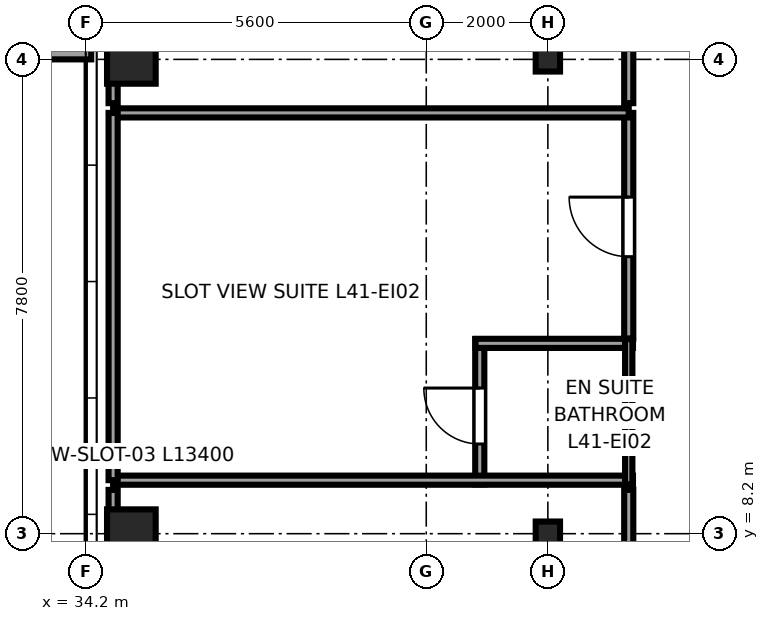
"""IFC4 building model, lengths in metres.
Left out: names, types, materials, properties, quantities, classifications, styles, units other than length and angle.
Written with IfcOpenShell. Run it as: python <this file> out.ifc"""

import sys

from ifc_helpers import new_model, si_unit, direction, frame, frame_2d, origin, origin_2d, place, context, subcontext, project, spatial, rectangle, i_section, extrude, source, transform, mapped, element, fill, save


model = new_model("IFC4")
c1 = context("Model", 3, precision=1e-05, world=origin(), true_north=direction((0.0, 1.0)))
c2 = subcontext(c1, "Body", "Model", "MODEL_VIEW")
j1 = project(units=[si_unit("LENGTHUNIT", "METRE"), si_unit("PLANEANGLEUNIT", "RADIAN")], contexts=[c1])
p1 = place(None, origin())
s1 = spatial("IfcSite", under=j1, at=p1, CompositionType="ELEMENT")
p2 = place(p1, origin())
s2 = spatial("IfcBuilding", under=s1, at=p2, CompositionType="ELEMENT")
p3 = place(p2, frame((0.0, 0.0, 157.7)))
s3 = spatial("IfcBuildingStorey", under=s2, at=p3, CompositionType="ELEMENT", Elevation=157.7)
m1 = source(origin(), c2, "Body", "SweptSolid", [
    extrude(rectangle(XDim=0.8, YDim=0.8, at=origin_2d()), origin(), (0.0, 0.0, 1.0), 3.55),
])
for number, where, z_axis, x_axis in (
    (1, (34.95, 8.2, 0.0), (0.0, 0.0, 1.0), (1.0, 0.0, 0.0)),
    (2, (34.95, 16.0, 0.0), (0.0, 0.0, 1.0), (1.0, 0.0, 0.0)),
):
    element("IfcColumn", number, at=place(p3, frame(where, z_axis=z_axis, x_axis=x_axis)), inside=s3, PredefinedType="COLUMN", context=c2, shape_type="MappedRepresentation", body=[
        mapped(m1, transform((0.0, 0.0, 0.0), x_axis=(1.0, 0.0, 0.0), y_axis=(0.0, 1.0, 0.0), z_axis=(0.0, 0.0, 1.0), scale=1.0)),
    ])
m2 = source(origin(), c2, "Body", "SweptSolid", [
    extrude(i_section(OverallWidth=0.4, OverallDepth=0.4, WebThickness=0.02, FlangeThickness=0.035, at=origin_2d()), origin(), (0.0, 0.0, 1.0), 3.55),
])
for number, where, z_axis, x_axis in (
    (3, (41.8, 8.2, 0.0), (0.0, 0.0, 1.0), (1.0, 0.0, 0.0)),
    (4, (41.8, 16.0, 0.0), (0.0, 0.0, 1.0), (1.0, 0.0, 0.0)),
):
    element("IfcColumn", number, at=place(p3, frame(where, z_axis=z_axis, x_axis=x_axis)), inside=s3, PredefinedType="COLUMN", context=c2, shape_type="MappedRepresentation", body=[
        mapped(m2, transform((0.0, 0.0, 0.0), x_axis=(1.0, 0.0, 0.0), y_axis=(0.0, 1.0, 0.0), z_axis=(0.0, 0.0, 1.0), scale=1.0)),
    ])
p4 = place(p3, frame((22.71, 16.175, 0.0), z_axis=(0.0, 0.0, 1.0), x_axis=(1.0, 0.0, 0.0)))
e5 = element("IfcWall", 5, at=p4, inside=s3, PredefinedType="SOLIDWALL", context=c2, shape_type="SweptSolid", body=[
    extrude(rectangle(XDim=11.58, YDim=0.35, at=frame_2d((5.79, 0.0))), origin(), (0.0, 0.0, 1.0), 2.758),
])
p5 = place(p4, frame((1.995, 0.0, 0.68)))
e6 = element("IfcOpeningElement", 6, at=p5, cuts=e5, PredefinedType="OPENING", context=c2, shape_type="SweptSolid", body=[
    extrude(rectangle(XDim=2.4, YDim=1.9, at=frame_2d((1.2, 0.95))), frame((0.0, 0.185, 0.0), z_axis=(0.0, -1.0, 0.0), x_axis=(1.0, 0.0, 0.0)), (0.0, 0.0, 1.0), 0.37),
])
p6 = place(p4, frame((7.185, 0.0, 0.68)))
e7 = element("IfcOpeningElement", 7, at=p6, cuts=e5, PredefinedType="OPENING", context=c2, shape_type="SweptSolid", body=[
    extrude(rectangle(XDim=2.4, YDim=1.9, at=frame_2d((1.2, 0.95))), frame((0.0, 0.185, 0.0), z_axis=(0.0, -1.0, 0.0), x_axis=(1.0, 0.0, 0.0)), (0.0, 0.0, 1.0), 0.37),
])
p7 = place(p3, frame((40.68, 9.01, 0.0), z_axis=(0.0, 0.0, 1.0), x_axis=(0.0, 1.0, 0.0)))
e8 = element("IfcWall", 8, at=p7, inside=s3, PredefinedType="PARTITIONING", context=c2, shape_type="SweptSolid", body=[
    extrude(rectangle(XDim=2.39, YDim=0.15, at=frame_2d((1.195, 0.0))), origin(), (0.0, 0.0, 1.0), 3.37),
])
p8 = place(p7, frame((0.665, 0.0, 0.0)))
e9 = element("IfcOpeningElement", 9, at=p8, cuts=e8, PredefinedType="OPENING", context=c2, shape_type="SweptSolid", body=[
    extrude(rectangle(XDim=0.92, YDim=2.01, at=frame_2d((0.46, 1.005))), frame((0.0, 0.085, 0.0), z_axis=(0.0, -1.0, 0.0), x_axis=(1.0, 0.0, 0.0)), (0.0, 0.0, 1.0), 0.17),
])
p9 = place(p3, frame((34.65, 9.08, 0.0), z_axis=(0.0, 0.0, 1.0), x_axis=(1.0, 0.0, 0.0)))
e10 = element("IfcWall", 10, at=p9, inside=s3, PredefinedType="PARTITIONING", context=c2, shape_type="SweptSolid", body=[
    extrude(rectangle(XDim=8.55, YDim=0.15, at=frame_2d((4.275, 0.0))), origin(), (0.0, 0.0, 1.0), 3.37),
])
p10 = place(p3, frame((40.61, 11.33, 0.0), z_axis=(0.0, 0.0, 1.0), x_axis=(1.0, 0.0, 0.0)))
e11 = element("IfcWall", 11, at=p10, inside=s3, PredefinedType="PARTITIONING", context=c2, shape_type="SweptSolid", body=[
    extrude(rectangle(XDim=2.59, YDim=0.15, at=frame_2d((1.295, 0.0))), origin(), (0.0, 0.0, 1.0), 3.37),
])
p11 = place(p3, frame((43.13, 9.01, 0.0), z_axis=(0.0, 0.0, 1.0), x_axis=(0.0, 1.0, 0.0)))
e12 = element("IfcWall", 12, at=p11, inside=s3, PredefinedType="PLUMBINGWALL", context=c2, shape_type="SweptSolid", body=[
    extrude(rectangle(XDim=2.39, YDim=0.12, at=frame_2d((1.195, 0.0))), origin(), (0.0, 0.0, 1.0), 3.37),
])
p12 = place(p3, frame((43.13, 5.91, 0.0), z_axis=(0.0, 0.0, 1.0), x_axis=(0.0, 1.0, 0.0)))
e13 = element("IfcWall", 13, at=p12, inside=s3, PredefinedType="PARTITIONING", context=c2, shape_type="SweptSolid", body=[
    extrude(rectangle(XDim=3.01, YDim=0.15, at=frame_2d((1.505, 0.0))), origin(), (0.0, 0.0, 1.0), 3.37),
])
p13 = place(p12, frame((0.995, 0.0, 0.0)))
e14 = element("IfcOpeningElement", 14, at=p13, cuts=e13, PredefinedType="OPENING", context=c2, shape_type="SweptSolid", body=[
    extrude(rectangle(XDim=0.98, YDim=2.12, at=frame_2d((0.49, 1.06))), frame((0.0, 0.085, 0.0), z_axis=(0.0, -1.0, 0.0), x_axis=(1.0, 0.0, 0.0)), (0.0, 0.0, 1.0), 0.17),
])
p14 = place(p3, frame((34.65, 3.005, 0.0), z_axis=(0.0, 0.0, 1.0), x_axis=(0.0, 1.0, 0.0)))
e15 = element("IfcWall", 15, at=p14, inside=s3, PredefinedType="PARTITIONING", context=c2, shape_type="SweptSolid", body=[
    extrude(rectangle(XDim=5.915, YDim=0.15, at=frame_2d((2.958, 0.0))), origin(), (0.0, 0.0, 1.0), 3.37),
])
p15 = place(p3, frame((43.13, 11.41, 0.0), z_axis=(0.0, 0.0, 1.0), x_axis=(0.0, 1.0, 0.0)))
e16 = element("IfcWall", 16, at=p15, inside=s3, PredefinedType="PARTITIONING", context=c2, shape_type="SweptSolid", body=[
    extrude(rectangle(XDim=3.71, YDim=0.15, at=frame_2d((1.855, 0.0))), origin(), (0.0, 0.0, 1.0), 3.37),
])
p16 = place(p15, frame((1.345, 0.0, 0.0)))
e17 = element("IfcOpeningElement", 17, at=p16, cuts=e16, PredefinedType="OPENING", context=c2, shape_type="SweptSolid", body=[
    extrude(rectangle(XDim=0.98, YDim=2.12, at=frame_2d((0.49, 1.06))), frame((0.0, 0.085, 0.0), z_axis=(0.0, -1.0, 0.0), x_axis=(1.0, 0.0, 0.0)), (0.0, 0.0, 1.0), 0.17),
])
p17 = place(p3, frame((34.65, 15.12, 0.0), z_axis=(0.0, 0.0, 1.0), x_axis=(1.0, 0.0, 0.0)))
e18 = element("IfcWall", 18, at=p17, inside=s3, PredefinedType="PARTITIONING", context=c2, shape_type="SweptSolid", body=[
    extrude(rectangle(XDim=8.48, YDim=0.15, at=frame_2d((4.24, 0.0))), origin(), (0.0, 0.0, 1.0), 3.37),
])
p18 = place(p3, frame((34.65, 9.08, 0.0), z_axis=(0.0, 0.0, 1.0), x_axis=(0.0, 1.0, 0.0)))
e19 = element("IfcWall", 19, at=p18, inside=s3, PredefinedType="PARTITIONING", context=c2, shape_type="SweptSolid", body=[
    extrude(rectangle(XDim=6.04, YDim=0.15, at=frame_2d((3.02, 0.0))), origin(), (0.0, 0.0, 1.0), 3.37),
])
p19 = place(p3, frame((43.13, 15.28, 0.0), z_axis=(0.0, 0.0, 1.0), x_axis=(0.0, 1.0, 0.0)))
e20 = element("IfcWall", 20, at=p19, inside=s3, PredefinedType="PARTITIONING", context=c2, shape_type="SweptSolid", body=[
    extrude(rectangle(XDim=3.61, YDim=0.15, at=frame_2d((1.805, 0.0))), origin(), (0.0, 0.0, 1.0), 3.37),
])
p20 = place(p19, frame((1.295, 0.0, 0.0)))
e21 = element("IfcOpeningElement", 21, at=p20, cuts=e20, PredefinedType="OPENING", context=c2, shape_type="SweptSolid", body=[
    extrude(rectangle(XDim=0.98, YDim=2.12, at=frame_2d((0.49, 1.06))), frame((0.0, 0.085, 0.0), z_axis=(0.0, -1.0, 0.0), x_axis=(1.0, 0.0, 0.0)), (0.0, 0.0, 1.0), 0.17),
])
p21 = place(p3, frame((34.65, 15.28, 0.0), z_axis=(0.0, 0.0, 1.0), x_axis=(0.0, 1.0, 0.0)))
e22 = element("IfcWall", 22, at=p21, inside=s3, PredefinedType="PARTITIONING", context=c2, shape_type="SweptSolid", body=[
    extrude(rectangle(XDim=5.94, YDim=0.15, at=frame_2d((2.97, 0.0))), origin(), (0.0, 0.0, 1.0), 3.37),
])
m3 = source(origin(), c2, "Body", "SweptSolid", [
    extrude(rectangle(XDim=0.92, YDim=2.01, at=frame_2d((0.46, 1.005))), frame((0.0, 0.025, 0.0), z_axis=(0.0, -1.0, 0.0), x_axis=(1.0, 0.0, 0.0)), (0.0, 0.0, 1.0), 0.05),
])
p22 = place(p8, origin())
e23 = element("IfcDoor", 23, at=p22, inside=s3, OperationType="SINGLE_SWING_RIGHT", PredefinedType="DOOR", context=c2, shape_type="MappedRepresentation", body=[
    mapped(m3, transform((0.0, 0.0, 0.0), x_axis=(1.0, 0.0, 0.0), y_axis=(0.0, 1.0, 0.0), z_axis=(0.0, 0.0, 1.0), scale=1.0)),
])
fill(e9, e23)
m4 = source(origin(), c2, "Body", "SweptSolid", [
    extrude(rectangle(XDim=0.98, YDim=2.12, at=frame_2d((0.49, 1.06))), frame((0.0, 0.025, 0.0), z_axis=(0.0, -1.0, 0.0), x_axis=(1.0, 0.0, 0.0)), (0.0, 0.0, 1.0), 0.05),
])
p23 = place(p16, origin())
e24 = element("IfcDoor", 24, at=p23, inside=s3, OperationType="SINGLE_SWING_RIGHT", PredefinedType="DOOR", context=c2, shape_type="MappedRepresentation", body=[
    mapped(m4, transform((0.0, 0.0, 0.0), x_axis=(1.0, 0.0, 0.0), y_axis=(0.0, 1.0, 0.0), z_axis=(0.0, 0.0, 1.0), scale=1.0)),
])
fill(e17, e24)
save(model, sys.argv[1])
